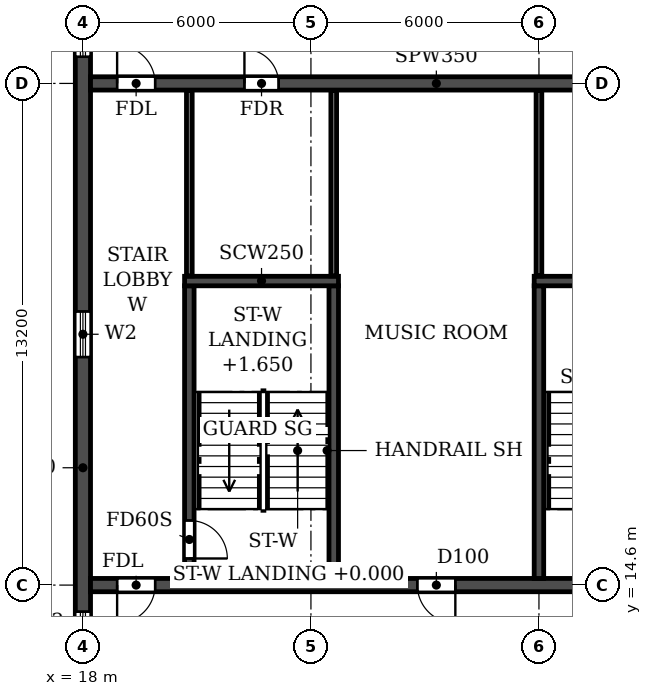
"""IFC4 building model, lengths in metres.
Left out: names, types, materials, properties, quantities, classifications, styles, units other than length and angle.
Written with IfcOpenShell. Run it as: python <this file> out.ifc"""

import sys

from ifc_helpers import new_model, si_unit, direction, frame, frame_2d, origin, place, context, subcontext, project, spatial, rectangle, extrude, element, fill, save


model = new_model("IFC4")
c1 = context("Model", 3, precision=1e-05, world=origin(), true_north=direction((0.0, 1.0)))
c2 = subcontext(c1, "Body", "Model", "MODEL_VIEW")
j1 = project(units=[si_unit("LENGTHUNIT", "METRE"), si_unit("PLANEANGLEUNIT", "RADIAN")], contexts=[c1])
p1 = place(None, origin())
s1 = spatial("IfcSite", under=j1, at=p1, CompositionType="ELEMENT")
p2 = place(p1, origin())
s2 = spatial("IfcBuilding", under=s1, at=p2, CompositionType="ELEMENT")
p3 = place(p2, frame((0.0, 0.0, 241.2)))
s3 = spatial("IfcBuildingStorey", under=s2, at=p3, CompositionType="ELEMENT", Elevation=241.2)
p4 = place(p3, frame((18.0, 4.683, 0.0), z_axis=(0.0, 0.0, 1.0), x_axis=(0.0, 1.0, 0.0)))
e1 = element("IfcWall", 1, at=p4, inside=s3, PredefinedType="SHEAR", context=c2, shape_type="SweptSolid", body=[
    extrude(rectangle(XDim=31.834, YDim=0.4, at=frame_2d((15.917, 0.0))), origin(), (0.0, 0.0, 1.0), 3.08),
])
p5 = place(p4, frame((23.817, 0.0, 0.9)))
e2 = element("IfcOpeningElement", 2, at=p5, cuts=e1, PredefinedType="OPENING", context=c2, shape_type="SweptSolid", body=[
    extrude(rectangle(XDim=1.2, YDim=1.5, at=frame_2d((0.6, 0.75))), frame((0.0, 0.21, 0.0), z_axis=(0.0, -1.0, 0.0), x_axis=(1.0, 0.0, 0.0)), (0.0, 0.0, 1.0), 0.42),
])
p6 = place(p4, frame((8.017, 0.0, 0.9)))
e3 = element("IfcOpeningElement", 3, at=p6, cuts=e1, PredefinedType="OPENING", context=c2, shape_type="SweptSolid", body=[
    extrude(rectangle(XDim=1.2, YDim=1.5, at=frame_2d((0.6, 0.75))), frame((0.0, 0.21, 0.0), z_axis=(0.0, -1.0, 0.0), x_axis=(1.0, 0.0, 0.0)), (0.0, 0.0, 1.0), 0.42),
])
p7 = place(p4, frame((27.694, 0.0, 0.6)))
e4 = element("IfcOpeningElement", 4, at=p7, cuts=e1, PredefinedType="OPENING", context=c2, shape_type="SweptSolid", body=[
    extrude(rectangle(XDim=2.2, YDim=1.8, at=frame_2d((1.1, 0.9))), frame((0.0, 0.21, 0.0), z_axis=(0.0, -1.0, 0.0), x_axis=(1.0, 0.0, 0.0)), (0.0, 0.0, 1.0), 0.42),
])
p8 = place(p4, frame((2.541, 0.0, 0.6)))
e5 = element("IfcOpeningElement", 5, at=p8, cuts=e1, PredefinedType="OPENING", context=c2, shape_type="SweptSolid", body=[
    extrude(rectangle(XDim=2.2, YDim=1.8, at=frame_2d((1.1, 0.9))), frame((0.0, 0.21, 0.0), z_axis=(0.0, -1.0, 0.0), x_axis=(1.0, 0.0, 0.0)), (0.0, 0.0, 1.0), 0.42),
])
p9 = place(p4, frame((15.917, 0.0, 0.9)))
e6 = element("IfcOpeningElement", 6, at=p9, cuts=e1, PredefinedType="OPENING", context=c2, shape_type="SweptSolid", body=[
    extrude(rectangle(XDim=1.2, YDim=1.5, at=frame_2d((0.6, 0.75))), frame((0.0, 0.21, 0.0), z_axis=(0.0, -1.0, 0.0), x_axis=(1.0, 0.0, 0.0)), (0.0, 0.0, 1.0), 0.42),
])
p10 = place(p3, frame((18.2, 14.6, 0.0), z_axis=(0.0, 0.0, 1.0), x_axis=(1.0, 0.0, 0.0)))
e7 = element("IfcWall", 7, at=p10, inside=s3, PredefinedType="SOLIDWALL", context=c2, shape_type="SweptSolid", body=[
    extrude(rectangle(XDim=65.6, YDim=0.35, at=frame_2d((32.8, 0.0))), origin(), (0.0, 0.0, 1.0), 3.08),
])
p11 = place(p10, frame((0.7, 0.0, 0.0)))
e8 = element("IfcOpeningElement", 8, at=p11, cuts=e7, PredefinedType="OPENING", context=c2, shape_type="SweptSolid", body=[
    extrude(rectangle(XDim=1.0, YDim=2.1, at=frame_2d((0.5, 1.05))), frame((0.0, 0.185, 0.0), z_axis=(0.0, -1.0, 0.0), x_axis=(1.0, 0.0, 0.0)), (0.0, 0.0, 1.0), 0.37),
])
p12 = place(p10, frame((8.6, 0.0, 0.0)))
e9 = element("IfcOpeningElement", 9, at=p12, cuts=e7, PredefinedType="OPENING", context=c2, shape_type="SweptSolid", body=[
    extrude(rectangle(XDim=1.0, YDim=2.1, at=frame_2d((0.5, 1.05))), frame((0.0, 0.185, 0.0), z_axis=(0.0, -1.0, 0.0), x_axis=(1.0, 0.0, 0.0)), (0.0, 0.0, 1.0), 0.37),
])
p13 = place(p10, frame((13.2, 0.0, 0.0)))
e10 = element("IfcOpeningElement", 10, at=p13, cuts=e7, PredefinedType="OPENING", context=c2, shape_type="SweptSolid", body=[
    extrude(rectangle(XDim=1.0, YDim=2.1, at=frame_2d((0.5, 1.05))), frame((0.0, 0.185, 0.0), z_axis=(0.0, -1.0, 0.0), x_axis=(1.0, 0.0, 0.0)), (0.0, 0.0, 1.0), 0.37),
])
p14 = place(p10, frame((25.8, 0.0, 0.0)))
e11 = element("IfcOpeningElement", 11, at=p14, cuts=e7, PredefinedType="OPENING", context=c2, shape_type="SweptSolid", body=[
    extrude(rectangle(XDim=1.0, YDim=2.1, at=frame_2d((0.5, 1.05))), frame((0.0, 0.185, 0.0), z_axis=(0.0, -1.0, 0.0), x_axis=(1.0, 0.0, 0.0)), (0.0, 0.0, 1.0), 0.37),
])
p15 = place(p10, frame((29.7, 0.0, 0.0)))
e12 = element("IfcOpeningElement", 12, at=p15, cuts=e7, PredefinedType="OPENING", context=c2, shape_type="SweptSolid", body=[
    extrude(rectangle(XDim=1.0, YDim=2.1, at=frame_2d((0.5, 1.05))), frame((0.0, 0.185, 0.0), z_axis=(0.0, -1.0, 0.0), x_axis=(1.0, 0.0, 0.0)), (0.0, 0.0, 1.0), 0.37),
])
p16 = place(p10, frame((32.3, 0.0, 0.0)))
e13 = element("IfcOpeningElement", 13, at=p16, cuts=e7, PredefinedType="OPENING", context=c2, shape_type="SweptSolid", body=[
    extrude(rectangle(XDim=1.0, YDim=2.1, at=frame_2d((0.5, 1.05))), frame((0.0, 0.185, 0.0), z_axis=(0.0, -1.0, 0.0), x_axis=(1.0, 0.0, 0.0)), (0.0, 0.0, 1.0), 0.37),
])
p17 = place(p10, frame((37.5, 0.0, 0.0)))
e14 = element("IfcOpeningElement", 14, at=p17, cuts=e7, PredefinedType="OPENING", context=c2, shape_type="SweptSolid", body=[
    extrude(rectangle(XDim=1.0, YDim=2.1, at=frame_2d((0.5, 1.05))), frame((0.0, 0.185, 0.0), z_axis=(0.0, -1.0, 0.0), x_axis=(1.0, 0.0, 0.0)), (0.0, 0.0, 1.0), 0.37),
])
p18 = place(p10, frame((51.4, 0.0, 0.0)))
e15 = element("IfcOpeningElement", 15, at=p18, cuts=e7, PredefinedType="OPENING", context=c2, shape_type="SweptSolid", body=[
    extrude(rectangle(XDim=1.0, YDim=2.1, at=frame_2d((0.5, 1.05))), frame((0.0, 0.185, 0.0), z_axis=(0.0, -1.0, 0.0), x_axis=(1.0, 0.0, 0.0)), (0.0, 0.0, 1.0), 0.37),
])
p19 = place(p10, frame((56.0, 0.0, 0.0)))
e16 = element("IfcOpeningElement", 16, at=p19, cuts=e7, PredefinedType="OPENING", context=c2, shape_type="SweptSolid", body=[
    extrude(rectangle(XDim=1.0, YDim=2.1, at=frame_2d((0.5, 1.05))), frame((0.0, 0.185, 0.0), z_axis=(0.0, -1.0, 0.0), x_axis=(1.0, 0.0, 0.0)), (0.0, 0.0, 1.0), 0.37),
])
p20 = place(p10, frame((63.9, 0.0, 0.0)))
e17 = element("IfcOpeningElement", 17, at=p20, cuts=e7, PredefinedType="OPENING", context=c2, shape_type="SweptSolid", body=[
    extrude(rectangle(XDim=1.0, YDim=2.1, at=frame_2d((0.5, 1.05))), frame((0.0, 0.185, 0.0), z_axis=(0.0, -1.0, 0.0), x_axis=(1.0, 0.0, 0.0)), (0.0, 0.0, 1.0), 0.37),
])
p21 = place(p3, frame((18.2, 27.8, 0.0), z_axis=(0.0, 0.0, 1.0), x_axis=(1.0, 0.0, 0.0)))
e18 = element("IfcWall", 18, at=p21, inside=s3, PredefinedType="SOLIDWALL", context=c2, shape_type="SweptSolid", body=[
    extrude(rectangle(XDim=65.6, YDim=0.35, at=frame_2d((32.8, 0.0))), origin(), (0.0, 0.0, 1.0), 3.08),
])
p22 = place(p21, frame((0.7, 0.0, 0.0)))
e19 = element("IfcOpeningElement", 19, at=p22, cuts=e18, PredefinedType="OPENING", context=c2, shape_type="SweptSolid", body=[
    extrude(rectangle(XDim=1.0, YDim=2.1, at=frame_2d((0.5, 1.05))), frame((0.0, 0.185, 0.0), z_axis=(0.0, -1.0, 0.0), x_axis=(1.0, 0.0, 0.0)), (0.0, 0.0, 1.0), 0.37),
])
p23 = place(p21, frame((4.05, 0.0, 0.0)))
e20 = element("IfcOpeningElement", 20, at=p23, cuts=e18, PredefinedType="OPENING", context=c2, shape_type="SweptSolid", body=[
    extrude(rectangle(XDim=0.9, YDim=2.1, at=frame_2d((0.45, 1.05))), frame((0.0, 0.185, 0.0), z_axis=(0.0, -1.0, 0.0), x_axis=(1.0, 0.0, 0.0)), (0.0, 0.0, 1.0), 0.37),
])
p24 = place(p21, frame((13.25, 0.0, 0.0)))
e21 = element("IfcOpeningElement", 21, at=p24, cuts=e18, PredefinedType="OPENING", context=c2, shape_type="SweptSolid", body=[
    extrude(rectangle(XDim=0.9, YDim=2.1, at=frame_2d((0.45, 1.05))), frame((0.0, 0.185, 0.0), z_axis=(0.0, -1.0, 0.0), x_axis=(1.0, 0.0, 0.0)), (0.0, 0.0, 1.0), 0.37),
])
p25 = place(p21, frame((17.7, 0.0, 0.0)))
e22 = element("IfcOpeningElement", 22, at=p25, cuts=e18, PredefinedType="OPENING", context=c2, shape_type="SweptSolid", body=[
    extrude(rectangle(XDim=1.0, YDim=2.1, at=frame_2d((0.5, 1.05))), frame((0.0, 0.185, 0.0), z_axis=(0.0, -1.0, 0.0), x_axis=(1.0, 0.0, 0.0)), (0.0, 0.0, 1.0), 0.37),
])
p26 = place(p21, frame((22.9, 0.0, 0.0)))
e23 = element("IfcOpeningElement", 23, at=p26, cuts=e18, PredefinedType="OPENING", context=c2, shape_type="SweptSolid", body=[
    extrude(rectangle(XDim=1.0, YDim=2.1, at=frame_2d((0.5, 1.05))), frame((0.0, 0.185, 0.0), z_axis=(0.0, -1.0, 0.0), x_axis=(1.0, 0.0, 0.0)), (0.0, 0.0, 1.0), 0.37),
])
p27 = place(p21, frame((29.4, 0.0, 0.0)))
e24 = element("IfcOpeningElement", 24, at=p27, cuts=e18, PredefinedType="OPENING", context=c2, shape_type="SweptSolid", body=[
    extrude(rectangle(XDim=1.0, YDim=2.1, at=frame_2d((0.5, 1.05))), frame((0.0, 0.185, 0.0), z_axis=(0.0, -1.0, 0.0), x_axis=(1.0, 0.0, 0.0)), (0.0, 0.0, 1.0), 0.37),
])
p28 = place(p21, frame((32.3, 0.0, 0.0)))
e25 = element("IfcOpeningElement", 25, at=p28, cuts=e18, PredefinedType="OPENING", context=c2, shape_type="SweptSolid", body=[
    extrude(rectangle(XDim=1.0, YDim=2.1, at=frame_2d((0.5, 1.05))), frame((0.0, 0.185, 0.0), z_axis=(0.0, -1.0, 0.0), x_axis=(1.0, 0.0, 0.0)), (0.0, 0.0, 1.0), 0.37),
])
p29 = place(p21, frame((36.5, 0.0, 0.0)))
e26 = element("IfcOpeningElement", 26, at=p29, cuts=e18, PredefinedType="OPENING", context=c2, shape_type="SweptSolid", body=[
    extrude(rectangle(XDim=1.0, YDim=2.1, at=frame_2d((0.5, 1.05))), frame((0.0, 0.185, 0.0), z_axis=(0.0, -1.0, 0.0), x_axis=(1.0, 0.0, 0.0)), (0.0, 0.0, 1.0), 0.37),
])
p30 = place(p21, frame((41.7, 0.0, 0.0)))
e27 = element("IfcOpeningElement", 27, at=p30, cuts=e18, PredefinedType="OPENING", context=c2, shape_type="SweptSolid", body=[
    extrude(rectangle(XDim=1.0, YDim=2.1, at=frame_2d((0.5, 1.05))), frame((0.0, 0.185, 0.0), z_axis=(0.0, -1.0, 0.0), x_axis=(1.0, 0.0, 0.0)), (0.0, 0.0, 1.0), 0.37),
])
p31 = place(p21, frame((45.6, 0.0, 0.0)))
e28 = element("IfcOpeningElement", 28, at=p31, cuts=e18, PredefinedType="OPENING", context=c2, shape_type="SweptSolid", body=[
    extrude(rectangle(XDim=1.0, YDim=2.1, at=frame_2d((0.5, 1.05))), frame((0.0, 0.185, 0.0), z_axis=(0.0, -1.0, 0.0), x_axis=(1.0, 0.0, 0.0)), (0.0, 0.0, 1.0), 0.37),
])
p32 = place(p21, frame((48.2, 0.0, 0.0)))
e29 = element("IfcOpeningElement", 29, at=p32, cuts=e18, PredefinedType="OPENING", context=c2, shape_type="SweptSolid", body=[
    extrude(rectangle(XDim=1.0, YDim=2.1, at=frame_2d((0.5, 1.05))), frame((0.0, 0.185, 0.0), z_axis=(0.0, -1.0, 0.0), x_axis=(1.0, 0.0, 0.0)), (0.0, 0.0, 1.0), 0.37),
])
p33 = place(p21, frame((51.45, 0.0, 0.0)))
e30 = element("IfcOpeningElement", 30, at=p33, cuts=e18, PredefinedType="OPENING", context=c2, shape_type="SweptSolid", body=[
    extrude(rectangle(XDim=0.9, YDim=2.1, at=frame_2d((0.45, 1.05))), frame((0.0, 0.185, 0.0), z_axis=(0.0, -1.0, 0.0), x_axis=(1.0, 0.0, 0.0)), (0.0, 0.0, 1.0), 0.37),
])
p34 = place(p21, frame((60.65, 0.0, 0.0)))
e31 = element("IfcOpeningElement", 31, at=p34, cuts=e18, PredefinedType="OPENING", context=c2, shape_type="SweptSolid", body=[
    extrude(rectangle(XDim=0.9, YDim=2.1, at=frame_2d((0.45, 1.05))), frame((0.0, 0.185, 0.0), z_axis=(0.0, -1.0, 0.0), x_axis=(1.0, 0.0, 0.0)), (0.0, 0.0, 1.0), 0.37),
])
p35 = place(p21, frame((63.9, 0.0, 0.0)))
e32 = element("IfcOpeningElement", 32, at=p35, cuts=e18, PredefinedType="OPENING", context=c2, shape_type="SweptSolid", body=[
    extrude(rectangle(XDim=1.0, YDim=2.1, at=frame_2d((0.5, 1.05))), frame((0.0, 0.185, 0.0), z_axis=(0.0, -1.0, 0.0), x_axis=(1.0, 0.0, 0.0)), (0.0, 0.0, 1.0), 0.37),
])
p36 = place(p3, frame((30.0, 14.775, 0.0), z_axis=(0.0, 0.0, 1.0), x_axis=(0.0, 1.0, 0.0)))
e33 = element("IfcWall", 33, at=p36, inside=s3, PredefinedType="SOLIDWALL", context=c2, shape_type="SweptSolid", body=[
    extrude(rectangle(XDim=7.7, YDim=0.25, at=frame_2d((3.85, 0.0))), origin(), (0.0, 0.0, 1.0), 3.08),
])
p37 = place(p3, frame((29.875, 22.6, 0.0), z_axis=(0.0, 0.0, 1.0), x_axis=(1.0, 0.0, 0.0)))
e34 = element("IfcWall", 34, at=p37, inside=s3, PredefinedType="SOLIDWALL", context=c2, shape_type="SweptSolid", body=[
    extrude(rectangle(XDim=4.05, YDim=0.25, at=frame_2d((2.025, 0.0))), origin(), (0.0, 0.0, 1.0), 3.08),
])
p38 = place(p3, frame((20.8, 14.775, 0.0), z_axis=(0.0, 0.0, 1.0), x_axis=(0.0, 1.0, 0.0)))
e35 = element("IfcWall", 35, at=p38, inside=s3, PredefinedType="SOLIDWALL", context=c2, shape_type="SweptSolid", body=[
    extrude(rectangle(XDim=7.7, YDim=0.25, at=frame_2d((3.85, 0.0))), origin(), (0.0, 0.0, 1.0), 3.08),
])
p39 = place(p38, frame((0.525, 0.0, 0.0)))
e36 = element("IfcOpeningElement", 36, at=p39, cuts=e35, PredefinedType="OPENING", context=c2, shape_type="SweptSolid", body=[
    extrude(rectangle(XDim=1.0, YDim=2.1, at=frame_2d((0.5, 1.05))), frame((0.0, 0.135, 0.0), z_axis=(0.0, -1.0, 0.0), x_axis=(1.0, 0.0, 0.0)), (0.0, 0.0, 1.0), 0.27),
])
p40 = place(p3, frame((24.6, 14.775, 0.0), z_axis=(0.0, 0.0, 1.0), x_axis=(0.0, 1.0, 0.0)))
e37 = element("IfcWall", 37, at=p40, inside=s3, PredefinedType="SOLIDWALL", context=c2, shape_type="SweptSolid", body=[
    extrude(rectangle(XDim=7.7, YDim=0.25, at=frame_2d((3.85, 0.0))), origin(), (0.0, 0.0, 1.0), 3.08),
])
p41 = place(p3, frame((20.675, 22.6, 0.0), z_axis=(0.0, 0.0, 1.0), x_axis=(1.0, 0.0, 0.0)))
e38 = element("IfcWall", 38, at=p41, inside=s3, PredefinedType="SOLIDWALL", context=c2, shape_type="SweptSolid", body=[
    extrude(rectangle(XDim=4.05, YDim=0.25, at=frame_2d((2.025, 0.0))), origin(), (0.0, 0.0, 1.0), 3.08),
])
for number, where, z_axis, x_axis in (
    (39, (20.8, 22.735, 0.0), (0.0, 0.0, 1.0), (0.0, 1.0, 0.0)),
    (40, (24.6, 22.735, 0.0), (0.0, 0.0, 1.0), (0.0, 1.0, 0.0)),
    (41, (30.0, 22.735, 0.0), (0.0, 0.0, 1.0), (0.0, 1.0, 0.0)),
):
    element("IfcWall", number, at=place(p3, frame(where, z_axis=z_axis, x_axis=x_axis)), inside=s3, PredefinedType="PARTITIONING", context=c2, shape_type="SweptSolid", body=[
        extrude(rectangle(XDim=4.88, YDim=0.15, at=frame_2d((2.44, 0.0))), origin(), (0.0, 0.0, 1.0), 3.08),
    ])
p42 = place(p5, origin())
e42 = element("IfcWindow", 42, at=p42, inside=s3, PartitioningType="SINGLE_PANEL", PredefinedType="WINDOW", context=c2, shape_type="SweptSolid", body=[
    extrude(rectangle(XDim=1.2, YDim=1.5, at=frame_2d((0.6, 0.75))), frame((0.0, 0.03, 0.0), z_axis=(0.0, -1.0, 0.0), x_axis=(1.0, 0.0, 0.0)), (0.0, 0.0, 1.0), 0.06),
])
fill(e2, e42)
p43 = place(p6, origin())
e43 = element("IfcWindow", 43, at=p43, inside=s3, PartitioningType="SINGLE_PANEL", PredefinedType="WINDOW", context=c2, shape_type="SweptSolid", body=[
    extrude(rectangle(XDim=1.2, YDim=1.5, at=frame_2d((0.6, 0.75))), frame((0.0, 0.03, 0.0), z_axis=(0.0, -1.0, 0.0), x_axis=(1.0, 0.0, 0.0)), (0.0, 0.0, 1.0), 0.06),
])
fill(e3, e43)
p44 = place(p9, origin())
e44 = element("IfcWindow", 44, at=p44, inside=s3, PartitioningType="SINGLE_PANEL", PredefinedType="WINDOW", context=c2, shape_type="SweptSolid", body=[
    extrude(rectangle(XDim=1.2, YDim=1.5, at=frame_2d((0.6, 0.75))), frame((0.0, 0.03, 0.0), z_axis=(0.0, -1.0, 0.0), x_axis=(1.0, 0.0, 0.0)), (0.0, 0.0, 1.0), 0.06),
])
fill(e6, e44)
p45 = place(p22, origin())
e45 = element("IfcDoor", 45, at=p45, inside=s3, OperationType="SINGLE_SWING_LEFT", PredefinedType="DOOR", context=c2, shape_type="SweptSolid", body=[
    extrude(rectangle(XDim=1.0, YDim=2.1, at=frame_2d((0.5, 1.05))), frame((0.0, 0.025, 0.0), z_axis=(0.0, -1.0, 0.0), x_axis=(1.0, 0.0, 0.0)), (0.0, 0.0, 1.0), 0.05),
])
fill(e19, e45)
p46 = place(p23, origin())
e46 = element("IfcDoor", 46, at=p46, inside=s3, OperationType="SINGLE_SWING_LEFT", PredefinedType="DOOR", context=c2, shape_type="SweptSolid", body=[
    extrude(rectangle(XDim=0.9, YDim=2.1, at=frame_2d((0.45, 1.05))), frame((0.0, 0.025, 0.0), z_axis=(0.0, -1.0, 0.0), x_axis=(1.0, 0.0, 0.0)), (0.0, 0.0, 1.0), 0.05),
])
fill(e20, e46)
p47 = place(p11, frame((1.0, 0.0, 0.0), z_axis=(0.0, 0.0, 1.0), x_axis=(-1.0, 0.0, 0.0)))
e47 = element("IfcDoor", 47, at=p47, inside=s3, OperationType="SINGLE_SWING_RIGHT", PredefinedType="DOOR", context=c2, shape_type="SweptSolid", body=[
    extrude(rectangle(XDim=1.0, YDim=2.1, at=frame_2d((0.5, 1.05))), frame((0.0, 0.025, 0.0), z_axis=(0.0, -1.0, 0.0), x_axis=(1.0, 0.0, 0.0)), (0.0, 0.0, 1.0), 0.05),
])
fill(e8, e47)
p48 = place(p12, frame((1.0, 0.0, 0.0), z_axis=(0.0, 0.0, 1.0), x_axis=(-1.0, 0.0, 0.0)))
e48 = element("IfcDoor", 48, at=p48, inside=s3, OperationType="SINGLE_SWING_LEFT", PredefinedType="DOOR", context=c2, shape_type="SweptSolid", body=[
    extrude(rectangle(XDim=1.0, YDim=2.1, at=frame_2d((0.5, 1.05))), frame((0.0, 0.025, 0.0), z_axis=(0.0, -1.0, 0.0), x_axis=(1.0, 0.0, 0.0)), (0.0, 0.0, 1.0), 0.05),
])
fill(e9, e48)
p49 = place(p39, frame((1.0, 0.0, 0.0), z_axis=(0.0, 0.0, 1.0), x_axis=(-1.0, 0.0, 0.0)))
e49 = element("IfcDoor", 49, at=p49, inside=s3, OperationType="SINGLE_SWING_RIGHT", PredefinedType="DOOR", context=c2, shape_type="SweptSolid", body=[
    extrude(rectangle(XDim=1.0, YDim=2.1, at=frame_2d((0.5, 1.05))), frame((0.0, 0.025, 0.0), z_axis=(0.0, -1.0, 0.0), x_axis=(1.0, 0.0, 0.0)), (0.0, 0.0, 1.0), 0.05),
])
fill(e36, e49)
save(model, sys.argv[1])
